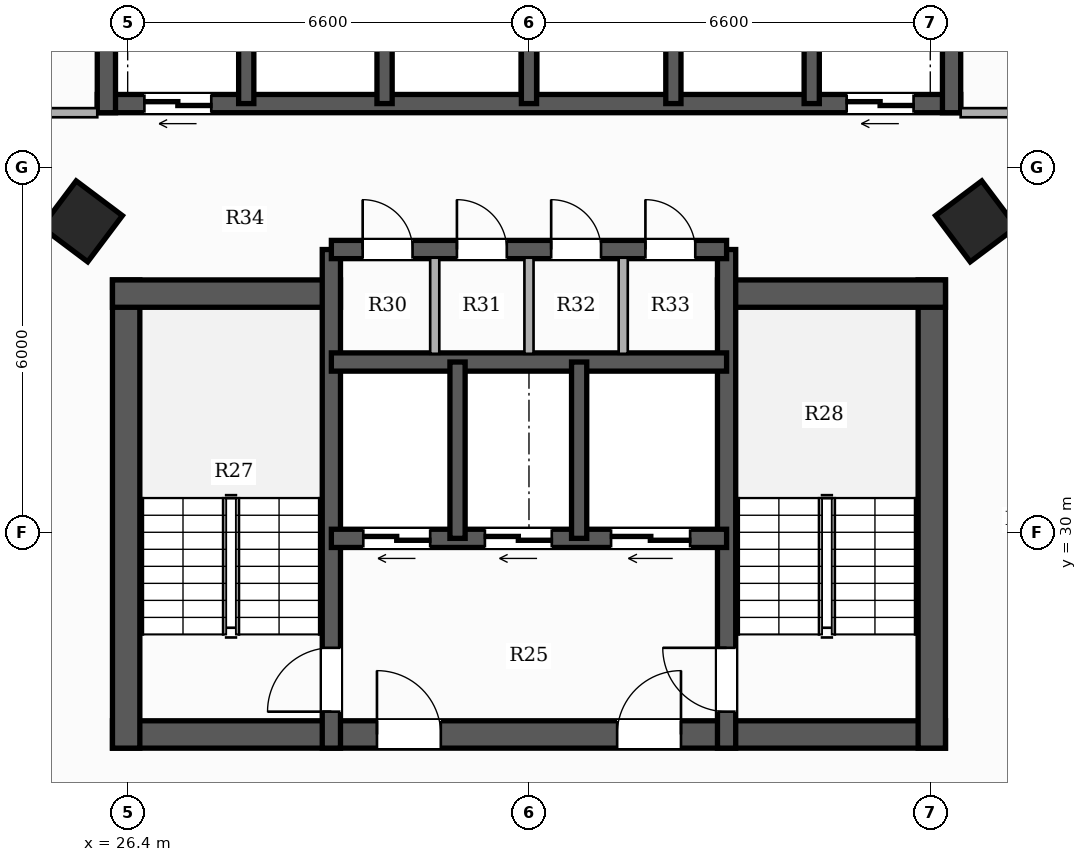
"""IFC4 building model, lengths in metres.
Left out: names, types, materials, properties, quantities, classifications, styles, units other than length and angle.
Written with IfcOpenShell. Run it as: python <this file> out.ifc"""

import sys

from ifc_helpers import new_model, si_unit, direction, frame, frame_2d, origin, origin_2d, place, context, subcontext, project, spatial, rectangle, hollow_rectangle, extrude, element, fill, save


model = new_model("IFC4")
c1 = context("Model", 3, precision=1e-05, world=origin(), true_north=direction((0.0, 1.0)))
c2 = subcontext(c1, "Body", "Model", "MODEL_VIEW")
j1 = project(units=[si_unit("LENGTHUNIT", "METRE"), si_unit("PLANEANGLEUNIT", "RADIAN")], contexts=[c1])
p1 = place(None, origin())
s1 = spatial("IfcSite", under=j1, at=p1, CompositionType="ELEMENT")
p2 = place(p1, origin())
s2 = spatial("IfcBuilding", under=s1, at=p2, CompositionType="ELEMENT")
p3 = place(p2, frame((0.0, 0.0, 74.15)))
s3 = spatial("IfcBuildingStorey", under=s2, at=p3, CompositionType="ELEMENT", Elevation=74.15)
p4 = place(p3, frame((26.15, 26.675, 0.0), z_axis=(0.0, 0.0, 1.0), x_axis=(1.0, 0.0, 0.0)))
e1 = element("IfcWall", 1, at=p4, inside=s3, PredefinedType="SHEAR", context=c2, shape_type="SweptSolid", body=[
    extrude(rectangle(XDim=13.7, YDim=0.45, at=frame_2d((6.85, 0.0))), origin(), (0.0, 0.0, 1.0), 3.3),
])
p5 = place(p4, frame((4.35, 0.0, 0.0)))
e2 = element("IfcOpeningElement", 2, at=p5, cuts=e1, PredefinedType="OPENING", context=c2, shape_type="SweptSolid", body=[
    extrude(rectangle(XDim=1.05, YDim=2.15, at=frame_2d((0.525, 1.075))), frame((0.0, 0.235, 0.0), z_axis=(0.0, -1.0, 0.0), x_axis=(1.0, 0.0, 0.0)), (0.0, 0.0, 1.0), 0.47),
])
p6 = place(p4, frame((8.3, 0.0, 0.0)))
e3 = element("IfcOpeningElement", 3, at=p6, cuts=e1, PredefinedType="OPENING", context=c2, shape_type="SweptSolid", body=[
    extrude(rectangle(XDim=1.05, YDim=2.15, at=frame_2d((0.525, 1.075))), frame((0.0, 0.235, 0.0), z_axis=(0.0, -1.0, 0.0), x_axis=(1.0, 0.0, 0.0)), (0.0, 0.0, 1.0), 0.47),
])
p7 = place(p3, frame((26.375, 26.45, 0.0), z_axis=(0.0, 0.0, 1.0), x_axis=(0.0, 1.0, 0.0)))
e4 = element("IfcWall", 4, at=p7, inside=s3, PredefinedType="SHEAR", context=c2, shape_type="SweptSolid", body=[
    extrude(rectangle(XDim=7.7, YDim=0.45, at=frame_2d((3.85, 0.0))), origin(), (0.0, 0.0, 1.0), 3.3),
])
p8 = place(p3, frame((26.15, 33.925, 0.0), z_axis=(0.0, 0.0, 1.0), x_axis=(1.0, 0.0, 0.0)))
e5 = element("IfcWall", 5, at=p8, inside=s3, PredefinedType="SHEAR", context=c2, shape_type="SweptSolid", body=[
    extrude(rectangle(XDim=3.75, YDim=0.45, at=frame_2d((1.875, 0.0))), origin(), (0.0, 0.0, 1.0), 3.3),
])
p9 = place(p3, frame((39.625, 26.45, 0.0), z_axis=(0.0, 0.0, 1.0), x_axis=(0.0, 1.0, 0.0)))
e6 = element("IfcWall", 6, at=p9, inside=s3, PredefinedType="SHEAR", context=c2, shape_type="SweptSolid", body=[
    extrude(rectangle(XDim=7.7, YDim=0.45, at=frame_2d((3.85, 0.0))), origin(), (0.0, 0.0, 1.0), 3.3),
])
p10 = place(p3, frame((36.1, 33.925, 0.0), z_axis=(0.0, 0.0, 1.0), x_axis=(1.0, 0.0, 0.0)))
e7 = element("IfcWall", 7, at=p10, inside=s3, PredefinedType="SHEAR", context=c2, shape_type="SweptSolid", body=[
    extrude(rectangle(XDim=3.75, YDim=0.45, at=frame_2d((1.875, 0.0))), origin(), (0.0, 0.0, 1.0), 3.3),
])
p11 = place(p3, frame((29.75, 26.45, 0.0), z_axis=(0.0, 0.0, 1.0), x_axis=(0.0, 1.0, 0.0)))
e8 = element("IfcWall", 8, at=p11, inside=s3, PredefinedType="SHEAR", context=c2, shape_type="SweptSolid", body=[
    extrude(rectangle(XDim=8.2, YDim=0.3, at=frame_2d((4.1, 0.0))), origin(), (0.0, 0.0, 1.0), 3.3),
])
p12 = place(p11, frame((0.6, 0.0, 0.0)))
e9 = element("IfcOpeningElement", 9, at=p12, cuts=e8, PredefinedType="OPENING", context=c2, shape_type="SweptSolid", body=[
    extrude(rectangle(XDim=1.05, YDim=2.15, at=frame_2d((0.525, 1.075))), frame((0.0, 0.16, 0.0), z_axis=(0.0, -1.0, 0.0), x_axis=(1.0, 0.0, 0.0)), (0.0, 0.0, 1.0), 0.32),
])
p13 = place(p3, frame((36.25, 26.45, 0.0), z_axis=(0.0, 0.0, 1.0), x_axis=(0.0, 1.0, 0.0)))
e10 = element("IfcWall", 10, at=p13, inside=s3, PredefinedType="SHEAR", context=c2, shape_type="SweptSolid", body=[
    extrude(rectangle(XDim=8.2, YDim=0.3, at=frame_2d((4.1, 0.0))), origin(), (0.0, 0.0, 1.0), 3.3),
])
p14 = place(p13, frame((0.6, 0.0, 0.0)))
e11 = element("IfcOpeningElement", 11, at=p14, cuts=e10, PredefinedType="OPENING", context=c2, shape_type="SweptSolid", body=[
    extrude(rectangle(XDim=1.05, YDim=2.15, at=frame_2d((0.525, 1.075))), frame((0.0, 0.16, 0.0), z_axis=(0.0, -1.0, 0.0), x_axis=(1.0, 0.0, 0.0)), (0.0, 0.0, 1.0), 0.32),
])
p15 = place(p3, frame((36.25, 29.9, 0.0), z_axis=(0.0, 0.0, 1.0), x_axis=(-1.0, 0.0, 0.0)))
e12 = element("IfcWall", 12, at=p15, inside=s3, PredefinedType="SHEAR", context=c2, shape_type="SweptSolid", body=[
    extrude(rectangle(XDim=6.5, YDim=0.3, at=frame_2d((3.25, 0.0))), origin(), (0.0, 0.0, 1.0), 3.3),
])
p16 = place(p15, frame((4.875, 0.0, 0.0)))
e13 = element("IfcOpeningElement", 13, at=p16, cuts=e12, PredefinedType="OPENING", context=c2, shape_type="SweptSolid", body=[
    extrude(rectangle(XDim=1.1, YDim=2.2, at=frame_2d((0.55, 1.1))), frame((0.0, 0.16, 0.0), z_axis=(0.0, -1.0, 0.0), x_axis=(1.0, 0.0, 0.0)), (0.0, 0.0, 1.0), 0.32),
])
p17 = place(p15, frame((2.875, 0.0, 0.0)))
e14 = element("IfcOpeningElement", 14, at=p17, cuts=e12, PredefinedType="OPENING", context=c2, shape_type="SweptSolid", body=[
    extrude(rectangle(XDim=1.1, YDim=2.2, at=frame_2d((0.55, 1.1))), frame((0.0, 0.16, 0.0), z_axis=(0.0, -1.0, 0.0), x_axis=(1.0, 0.0, 0.0)), (0.0, 0.0, 1.0), 0.32),
])
p18 = place(p15, frame((0.6, 0.0, 0.0)))
e15 = element("IfcOpeningElement", 15, at=p18, cuts=e12, PredefinedType="OPENING", context=c2, shape_type="SweptSolid", body=[
    extrude(rectangle(XDim=1.3, YDim=2.2, at=frame_2d((0.65, 1.1))), frame((0.0, 0.16, 0.0), z_axis=(0.0, -1.0, 0.0), x_axis=(1.0, 0.0, 0.0)), (0.0, 0.0, 1.0), 0.32),
])
p19 = place(p3, frame((29.75, 32.8, 0.0), z_axis=(0.0, 0.0, 1.0), x_axis=(1.0, 0.0, 0.0)))
e16 = element("IfcWall", 16, at=p19, inside=s3, PredefinedType="SHEAR", context=c2, shape_type="SweptSolid", body=[
    extrude(rectangle(XDim=6.5, YDim=0.3, at=frame_2d((3.25, 0.0))), origin(), (0.0, 0.0, 1.0), 3.3),
])
for number, where, z_axis, x_axis in (
    (17, (31.825, 29.9, 0.0), (0.0, 0.0, 1.0), (0.0, 1.0, 0.0)),
    (18, (33.825, 29.9, 0.0), (0.0, 0.0, 1.0), (0.0, 1.0, 0.0)),
):
    element("IfcWall", number, at=place(p3, frame(where, z_axis=z_axis, x_axis=x_axis)), inside=s3, PredefinedType="SHEAR", context=c2, shape_type="SweptSolid", body=[
        extrude(rectangle(XDim=2.9, YDim=0.25, at=frame_2d((1.45, 0.0))), origin(), (0.0, 0.0, 1.0), 3.3),
    ])
p20 = place(p3, frame((29.75, 34.65, 0.0), z_axis=(0.0, 0.0, 1.0), x_axis=(1.0, 0.0, 0.0)))
e19 = element("IfcWall", 19, at=p20, inside=s3, PredefinedType="SHEAR", context=c2, shape_type="SweptSolid", body=[
    extrude(rectangle(XDim=6.5, YDim=0.3, at=frame_2d((3.25, 0.0))), origin(), (0.0, 0.0, 1.0), 3.3),
])
p21 = place(p20, frame((0.515, 0.0, 0.0)))
e20 = element("IfcOpeningElement", 20, at=p21, cuts=e19, PredefinedType="OPENING", context=c2, shape_type="SweptSolid", body=[
    extrude(rectangle(XDim=0.82, YDim=2.1, at=frame_2d((0.41, 1.05))), frame((0.0, 0.16, 0.0), z_axis=(0.0, -1.0, 0.0), x_axis=(1.0, 0.0, 0.0)), (0.0, 0.0, 1.0), 0.32),
])
p22 = place(p20, frame((2.065, 0.0, 0.0)))
e21 = element("IfcOpeningElement", 21, at=p22, cuts=e19, PredefinedType="OPENING", context=c2, shape_type="SweptSolid", body=[
    extrude(rectangle(XDim=0.82, YDim=2.1, at=frame_2d((0.41, 1.05))), frame((0.0, 0.16, 0.0), z_axis=(0.0, -1.0, 0.0), x_axis=(1.0, 0.0, 0.0)), (0.0, 0.0, 1.0), 0.32),
])
p23 = place(p20, frame((3.615, 0.0, 0.0)))
e22 = element("IfcOpeningElement", 22, at=p23, cuts=e19, PredefinedType="OPENING", context=c2, shape_type="SweptSolid", body=[
    extrude(rectangle(XDim=0.82, YDim=2.1, at=frame_2d((0.41, 1.05))), frame((0.0, 0.16, 0.0), z_axis=(0.0, -1.0, 0.0), x_axis=(1.0, 0.0, 0.0)), (0.0, 0.0, 1.0), 0.32),
])
p24 = place(p20, frame((5.165, 0.0, 0.0)))
e23 = element("IfcOpeningElement", 23, at=p24, cuts=e19, PredefinedType="OPENING", context=c2, shape_type="SweptSolid", body=[
    extrude(rectangle(XDim=0.82, YDim=2.1, at=frame_2d((0.41, 1.05))), frame((0.0, 0.16, 0.0), z_axis=(0.0, -1.0, 0.0), x_axis=(1.0, 0.0, 0.0)), (0.0, 0.0, 1.0), 0.32),
])
p25 = place(p3, frame((40.1, 37.05, 0.0), z_axis=(0.0, 0.0, 1.0), x_axis=(-1.0, 0.0, 0.0)))
e24 = element("IfcWall", 24, at=p25, inside=s3, PredefinedType="SHEAR", context=c2, shape_type="SweptSolid", body=[
    extrude(rectangle(XDim=14.2, YDim=0.3, at=frame_2d((7.1, 0.0))), origin(), (0.0, 0.0, 1.0), 3.3),
])
p26 = place(p25, frame((12.325, 0.0, 0.0)))
e25 = element("IfcOpeningElement", 25, at=p26, cuts=e24, PredefinedType="OPENING", context=c2, shape_type="SweptSolid", body=[
    extrude(rectangle(XDim=1.1, YDim=2.2, at=frame_2d((0.55, 1.1))), frame((0.0, 0.16, 0.0), z_axis=(0.0, -1.0, 0.0), x_axis=(1.0, 0.0, 0.0)), (0.0, 0.0, 1.0), 0.32),
])
p27 = place(p25, frame((0.775, 0.0, 0.0)))
e26 = element("IfcOpeningElement", 26, at=p27, cuts=e24, PredefinedType="OPENING", context=c2, shape_type="SweptSolid", body=[
    extrude(rectangle(XDim=1.1, YDim=2.2, at=frame_2d((0.55, 1.1))), frame((0.0, 0.16, 0.0), z_axis=(0.0, -1.0, 0.0), x_axis=(1.0, 0.0, 0.0)), (0.0, 0.0, 1.0), 0.32),
])
for number, where, z_axis, x_axis in (
    (27, (26.05, 36.9, 0.0), (0.0, 0.0, 1.0), (0.0, 1.0, 0.0)),
    (28, (39.95, 36.9, 0.0), (0.0, 0.0, 1.0), (0.0, 1.0, 0.0)),
):
    element("IfcWall", number, at=place(p3, frame(where, z_axis=z_axis, x_axis=x_axis)), inside=s3, PredefinedType="SHEAR", context=c2, shape_type="SweptSolid", body=[
        extrude(rectangle(XDim=2.85, YDim=0.3, at=frame_2d((1.425, 0.0))), origin(), (0.0, 0.0, 1.0), 3.3),
    ])
for number, where, z_axis, x_axis in (
    (29, (28.35, 37.05, 0.0), (0.0, 0.0, 1.0), (0.0, 1.0, 0.0)),
    (30, (30.625, 37.05, 0.0), (0.0, 0.0, 1.0), (0.0, 1.0, 0.0)),
    (31, (33.0, 37.05, 0.0), (0.0, 0.0, 1.0), (0.0, 1.0, 0.0)),
    (32, (35.375, 37.05, 0.0), (0.0, 0.0, 1.0), (0.0, 1.0, 0.0)),
    (33, (37.65, 37.05, 0.0), (0.0, 0.0, 1.0), (0.0, 1.0, 0.0)),
):
    element("IfcWall", number, at=place(p3, frame(where, z_axis=z_axis, x_axis=x_axis)), inside=s3, PredefinedType="SHEAR", context=c2, shape_type="SweptSolid", body=[
        extrude(rectangle(XDim=2.55, YDim=0.25, at=frame_2d((1.275, 0.0))), origin(), (0.0, 0.0, 1.0), 3.3),
    ])
for number, where, z_axis, x_axis in (
    (34, (25.648, 35.113, 0.0), (0.0, 0.0, 1.0), (0.6, 0.8, 0.0)),
    (35, (40.352, 35.113, 0.0), (0.0, 0.0, 1.0), (-0.6, 0.8, 0.0)),
):
    element("IfcColumn", number, at=place(p3, frame(where, z_axis=z_axis, x_axis=x_axis)), inside=s3, PredefinedType="COLUMN", context=c2, shape_type="SweptSolid", body=[
        extrude(hollow_rectangle(XDim=0.95, YDim=0.95, WallThickness=0.032, at=origin_2d()), origin(), (0.0, 0.0, 1.0), 3.3),
    ])
for number, where, z_axis, x_axis in (
    (36, (31.45, 32.935, 0.0), (0.0, 0.0, 1.0), (0.0, 1.0, 0.0)),
    (37, (33.0, 32.935, 0.0), (0.0, 0.0, 1.0), (0.0, 1.0, 0.0)),
    (38, (34.55, 32.935, 0.0), (0.0, 0.0, 1.0), (0.0, 1.0, 0.0)),
):
    element("IfcWall", number, at=place(p3, frame(where, z_axis=z_axis, x_axis=x_axis)), inside=s3, PredefinedType="PARTITIONING", context=c2, shape_type="SweptSolid", body=[
        extrude(rectangle(XDim=1.58, YDim=0.15, at=frame_2d((0.79, 0.0))), origin(), (0.0, 0.0, 1.0), 3.06),
    ])
p28 = place(p3, frame((40.1, 36.9, 0.0), z_axis=(0.0, 0.0, 1.0), x_axis=(1.0, 0.0, 0.0)))
e39 = element("IfcWall", 39, at=p28, inside=s3, PredefinedType="PARTITIONING", context=c2, shape_type="SweptSolid", body=[
    extrude(rectangle(XDim=2.55, YDim=0.15, at=frame_2d((1.275, 0.0))), origin(), (0.0, 0.0, 1.0), 2.413),
])
p29 = place(p3, frame((23.41, 36.9, 0.0), z_axis=(0.0, 0.0, 1.0), x_axis=(1.0, 0.0, 0.0)))
e40 = element("IfcWall", 40, at=p29, inside=s3, PredefinedType="PARTITIONING", context=c2, shape_type="SweptSolid", body=[
    extrude(rectangle(XDim=2.49, YDim=0.15, at=frame_2d((1.245, 0.0))), origin(), (0.0, 0.0, 1.0), 2.413),
])
p30 = place(p12, origin())
e41 = element("IfcDoor", 41, at=p30, inside=s3, OperationType="SINGLE_SWING_LEFT", PredefinedType="DOOR", context=c2, shape_type="SweptSolid", body=[
    extrude(rectangle(XDim=1.05, YDim=2.15, at=frame_2d((0.525, 1.075))), frame((0.0, 0.025, 0.0), z_axis=(0.0, -1.0, 0.0), x_axis=(1.0, 0.0, 0.0)), (0.0, 0.0, 1.0), 0.05),
])
fill(e9, e41)
p31 = place(p14, origin())
e42 = element("IfcDoor", 42, at=p31, inside=s3, OperationType="SINGLE_SWING_RIGHT", PredefinedType="DOOR", context=c2, shape_type="SweptSolid", body=[
    extrude(rectangle(XDim=1.05, YDim=2.15, at=frame_2d((0.525, 1.075))), frame((0.0, 0.025, 0.0), z_axis=(0.0, -1.0, 0.0), x_axis=(1.0, 0.0, 0.0)), (0.0, 0.0, 1.0), 0.05),
])
fill(e11, e42)
p32 = place(p5, origin())
e43 = element("IfcDoor", 43, at=p32, inside=s3, OperationType="SINGLE_SWING_LEFT", PredefinedType="DOOR", context=c2, shape_type="SweptSolid", body=[
    extrude(rectangle(XDim=1.05, YDim=2.15, at=frame_2d((0.525, 1.075))), frame((0.0, 0.025, 0.0), z_axis=(0.0, -1.0, 0.0), x_axis=(1.0, 0.0, 0.0)), (0.0, 0.0, 1.0), 0.05),
])
fill(e2, e43)
p33 = place(p6, origin())
e44 = element("IfcDoor", 44, at=p33, inside=s3, OperationType="SINGLE_SWING_RIGHT", PredefinedType="DOOR", context=c2, shape_type="SweptSolid", body=[
    extrude(rectangle(XDim=1.05, YDim=2.15, at=frame_2d((0.525, 1.075))), frame((0.0, 0.025, 0.0), z_axis=(0.0, -1.0, 0.0), x_axis=(1.0, 0.0, 0.0)), (0.0, 0.0, 1.0), 0.05),
])
fill(e3, e44)
p34 = place(p16, origin())
e45 = element("IfcDoor", 45, at=p34, inside=s3, OperationType="DOUBLE_DOOR_SLIDING", PredefinedType="DOOR", context=c2, shape_type="SweptSolid", body=[
    extrude(rectangle(XDim=1.1, YDim=2.2, at=frame_2d((0.55, 1.1))), frame((0.0, 0.025, 0.0), z_axis=(0.0, -1.0, 0.0), x_axis=(1.0, 0.0, 0.0)), (0.0, 0.0, 1.0), 0.05),
])
fill(e13, e45)
p35 = place(p17, origin())
e46 = element("IfcDoor", 46, at=p35, inside=s3, OperationType="DOUBLE_DOOR_SLIDING", PredefinedType="DOOR", context=c2, shape_type="SweptSolid", body=[
    extrude(rectangle(XDim=1.1, YDim=2.2, at=frame_2d((0.55, 1.1))), frame((0.0, 0.025, 0.0), z_axis=(0.0, -1.0, 0.0), x_axis=(1.0, 0.0, 0.0)), (0.0, 0.0, 1.0), 0.05),
])
fill(e14, e46)
p36 = place(p18, origin())
e47 = element("IfcDoor", 47, at=p36, inside=s3, OperationType="DOUBLE_DOOR_SLIDING", PredefinedType="DOOR", context=c2, shape_type="SweptSolid", body=[
    extrude(rectangle(XDim=1.3, YDim=2.2, at=frame_2d((0.65, 1.1))), frame((0.0, 0.025, 0.0), z_axis=(0.0, -1.0, 0.0), x_axis=(1.0, 0.0, 0.0)), (0.0, 0.0, 1.0), 0.05),
])
fill(e15, e47)
p37 = place(p26, origin())
e48 = element("IfcDoor", 48, at=p37, inside=s3, OperationType="DOUBLE_DOOR_SLIDING", PredefinedType="DOOR", context=c2, shape_type="SweptSolid", body=[
    extrude(rectangle(XDim=1.1, YDim=2.2, at=frame_2d((0.55, 1.1))), frame((0.0, 0.025, 0.0), z_axis=(0.0, -1.0, 0.0), x_axis=(1.0, 0.0, 0.0)), (0.0, 0.0, 1.0), 0.05),
])
fill(e25, e48)
p38 = place(p27, origin())
e49 = element("IfcDoor", 49, at=p38, inside=s3, OperationType="DOUBLE_DOOR_SLIDING", PredefinedType="DOOR", context=c2, shape_type="SweptSolid", body=[
    extrude(rectangle(XDim=1.1, YDim=2.2, at=frame_2d((0.55, 1.1))), frame((0.0, 0.025, 0.0), z_axis=(0.0, -1.0, 0.0), x_axis=(1.0, 0.0, 0.0)), (0.0, 0.0, 1.0), 0.05),
])
fill(e26, e49)
p39 = place(p21, origin())
e50 = element("IfcDoor", 50, at=p39, inside=s3, OperationType="SINGLE_SWING_LEFT", PredefinedType="DOOR", context=c2, shape_type="SweptSolid", body=[
    extrude(rectangle(XDim=0.82, YDim=2.1, at=frame_2d((0.41, 1.05))), frame((0.0, 0.025, 0.0), z_axis=(0.0, -1.0, 0.0), x_axis=(1.0, 0.0, 0.0)), (0.0, 0.0, 1.0), 0.05),
])
fill(e20, e50)
p40 = place(p22, origin())
e51 = element("IfcDoor", 51, at=p40, inside=s3, OperationType="SINGLE_SWING_LEFT", PredefinedType="DOOR", context=c2, shape_type="SweptSolid", body=[
    extrude(rectangle(XDim=0.82, YDim=2.1, at=frame_2d((0.41, 1.05))), frame((0.0, 0.025, 0.0), z_axis=(0.0, -1.0, 0.0), x_axis=(1.0, 0.0, 0.0)), (0.0, 0.0, 1.0), 0.05),
])
fill(e21, e51)
p41 = place(p23, origin())
e52 = element("IfcDoor", 52, at=p41, inside=s3, OperationType="SINGLE_SWING_LEFT", PredefinedType="DOOR", context=c2, shape_type="SweptSolid", body=[
    extrude(rectangle(XDim=0.82, YDim=2.1, at=frame_2d((0.41, 1.05))), frame((0.0, 0.025, 0.0), z_axis=(0.0, -1.0, 0.0), x_axis=(1.0, 0.0, 0.0)), (0.0, 0.0, 1.0), 0.05),
])
fill(e22, e52)
p42 = place(p24, origin())
e53 = element("IfcDoor", 53, at=p42, inside=s3, OperationType="SINGLE_SWING_LEFT", PredefinedType="DOOR", context=c2, shape_type="SweptSolid", body=[
    extrude(rectangle(XDim=0.82, YDim=2.1, at=frame_2d((0.41, 1.05))), frame((0.0, 0.025, 0.0), z_axis=(0.0, -1.0, 0.0), x_axis=(1.0, 0.0, 0.0)), (0.0, 0.0, 1.0), 0.05),
])
fill(e23, e53)
save(model, sys.argv[1])
